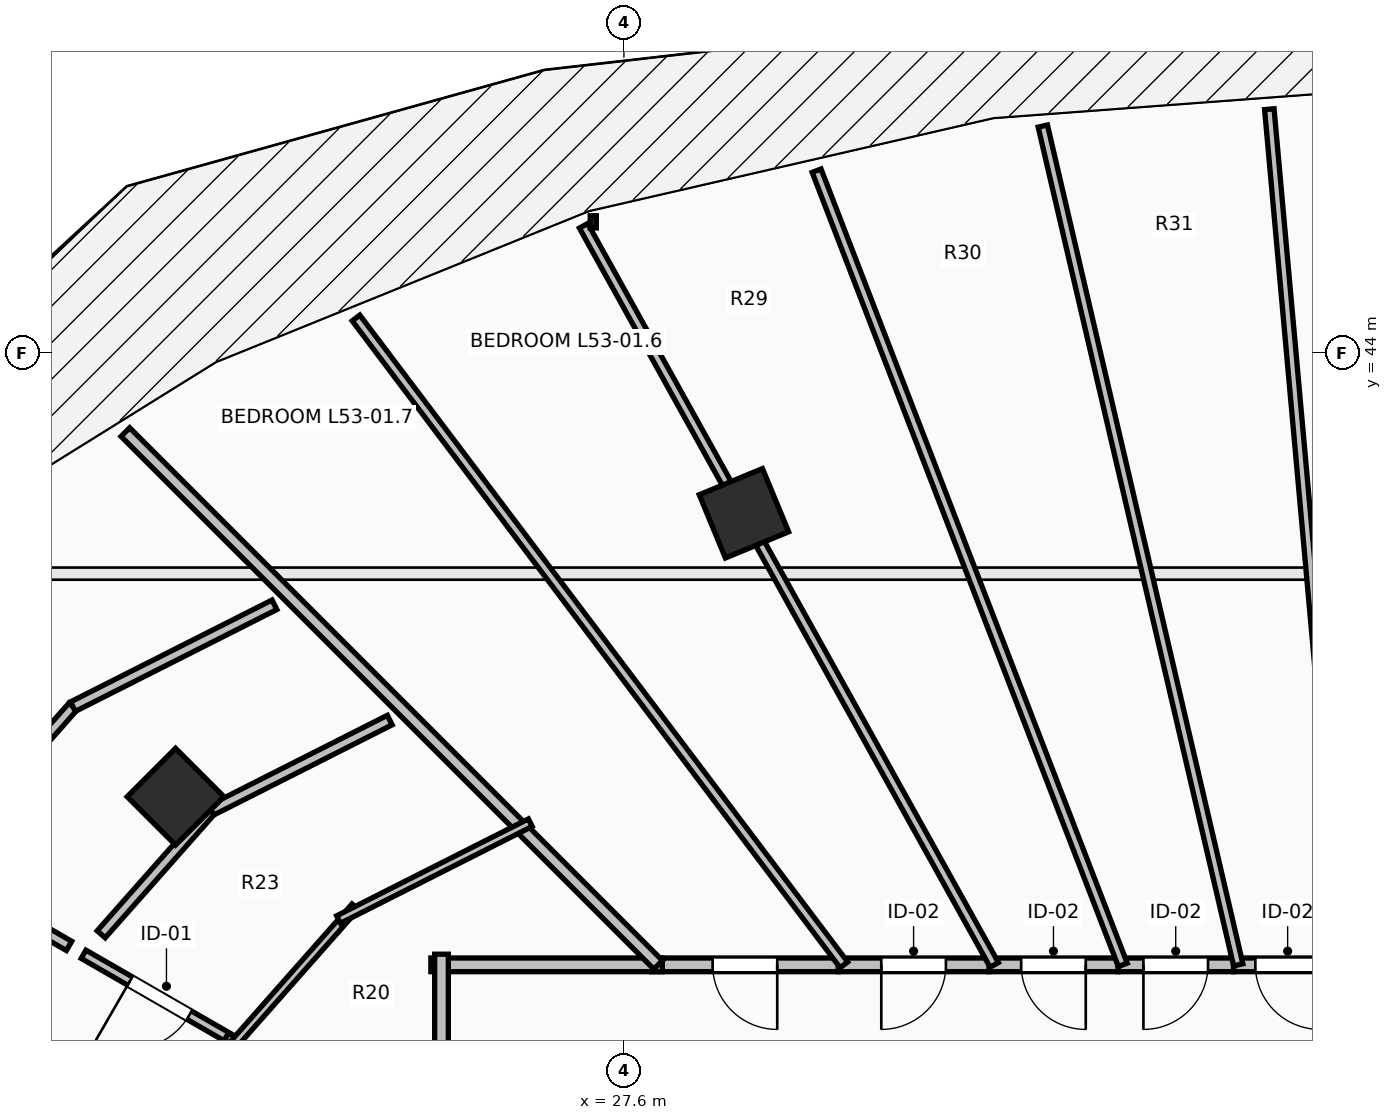
"""IFC4 building model, lengths in metres.
Left out: names, types, materials, properties, quantities, classifications, styles, units other than length and angle.
Written with IfcOpenShell. Run it as: python <this file> out.ifc"""

import sys

from ifc_helpers import new_model, si_unit, direction, frame, frame_2d, origin, origin_2d, place, context, subcontext, project, spatial, rectangle, extrude, element, fill, save


model = new_model("IFC4")
c1 = context("Model", 3, precision=1e-05, world=origin(), true_north=direction((0.0, 1.0)))
c2 = subcontext(c1, "Body", "Model", "MODEL_VIEW")
j1 = project(units=[si_unit("LENGTHUNIT", "METRE"), si_unit("PLANEANGLEUNIT", "RADIAN")], contexts=[c1])
p1 = place(None, origin())
s1 = spatial("IfcSite", under=j1, at=p1, CompositionType="ELEMENT")
p2 = place(p1, origin())
s2 = spatial("IfcBuilding", under=s1, at=p2, CompositionType="ELEMENT")
p3 = place(p2, frame((0.0, 0.0, 196.6)))
s3 = spatial("IfcBuildingStorey", under=s2, at=p3, CompositionType="ELEMENT", Elevation=196.6)
for number, where, z_axis, x_axis in (
    (1, (29.179, 41.891, 0.0), (0.0, 0.0, 1.0), (-0.383, 0.924, 0.0)),
    (2, (21.701, 38.162, 0.0), (0.0, 0.0, 1.0), (-0.707, 0.707, 0.0)),
):
    element("IfcColumn", number, at=place(p3, frame(where, z_axis=z_axis, x_axis=x_axis)), inside=s3, PredefinedType="COLUMN", context=c2, shape_type="SweptSolid", body=[
        extrude(rectangle(XDim=0.9, YDim=0.9, at=origin_2d()), origin(), (0.0, 0.0, 1.0), 3.5),
    ])
p4 = place(p3, frame((37.044, 35.95, 0.0), z_axis=(0.0, 0.0, 1.0), x_axis=(-1.0, 0.0, 0.0)))
e3 = element("IfcWall", 3, at=p4, inside=s3, PredefinedType="PARTITIONING", context=c2, shape_type="SweptSolid", body=[
    extrude(rectangle(XDim=1.424, YDim=0.18, at=frame_2d((0.712, 0.0))), origin(), (0.0, 0.0, 1.0), 3.24),
])
p5 = place(p4, frame((0.287, 0.0, 0.0)))
e4 = element("IfcOpeningElement", 4, at=p5, cuts=e3, PredefinedType="OPENING", context=c2, shape_type="SweptSolid", body=[
    extrude(rectangle(XDim=0.85, YDim=2.1, at=frame_2d((0.425, 1.05))), frame((0.0, 0.105, 0.0), z_axis=(0.0, -1.0, 0.0), x_axis=(1.0, 0.0, 0.0)), (0.0, 0.0, 1.0), 0.21),
])
p6 = place(p3, frame((35.62, 35.95, 0.0), z_axis=(0.0, 0.0, 1.0), x_axis=(-1.0, 0.0, 0.0)))
e5 = element("IfcWall", 5, at=p6, inside=s3, PredefinedType="PARTITIONING", context=c2, shape_type="SweptSolid", body=[
    extrude(rectangle(XDim=1.521, YDim=0.18, at=frame_2d((0.76, 0.0))), origin(), (0.0, 0.0, 1.0), 3.24),
])
p7 = place(p6, frame((0.335, 0.0, 0.0)))
e6 = element("IfcOpeningElement", 6, at=p7, cuts=e5, PredefinedType="OPENING", context=c2, shape_type="SweptSolid", body=[
    extrude(rectangle(XDim=0.85, YDim=2.1, at=frame_2d((0.425, 1.05))), frame((0.0, 0.105, 0.0), z_axis=(0.0, -1.0, 0.0), x_axis=(1.0, 0.0, 0.0)), (0.0, 0.0, 1.0), 0.21),
])
p8 = place(p3, frame((34.099, 35.95, 0.0), z_axis=(0.0, 0.0, 1.0), x_axis=(-1.0, 0.0, 0.0)))
e7 = element("IfcWall", 7, at=p8, inside=s3, PredefinedType="PARTITIONING", context=c2, shape_type="SweptSolid", body=[
    extrude(rectangle(XDim=1.696, YDim=0.18, at=frame_2d((0.848, 0.0))), origin(), (0.0, 0.0, 1.0), 3.24),
])
p9 = place(p8, frame((0.423, 0.0, 0.0)))
e8 = element("IfcOpeningElement", 8, at=p9, cuts=e7, PredefinedType="OPENING", context=c2, shape_type="SweptSolid", body=[
    extrude(rectangle(XDim=0.85, YDim=2.1, at=frame_2d((0.425, 1.05))), frame((0.0, 0.105, 0.0), z_axis=(0.0, -1.0, 0.0), x_axis=(1.0, 0.0, 0.0)), (0.0, 0.0, 1.0), 0.21),
])
p10 = place(p3, frame((32.403, 35.95, 0.0), z_axis=(0.0, 0.0, 1.0), x_axis=(-1.0, 0.0, 0.0)))
e9 = element("IfcWall", 9, at=p10, inside=s3, PredefinedType="PARTITIONING", context=c2, shape_type="SweptSolid", body=[
    extrude(rectangle(XDim=1.984, YDim=0.18, at=frame_2d((0.992, 0.0))), origin(), (0.0, 0.0, 1.0), 2.432),
])
p11 = place(p10, frame((0.567, 0.0, 0.0)))
e10 = element("IfcOpeningElement", 10, at=p11, cuts=e9, PredefinedType="OPENING", context=c2, shape_type="SweptSolid", body=[
    extrude(rectangle(XDim=0.85, YDim=2.1, at=frame_2d((0.425, 1.05))), frame((0.0, 0.105, 0.0), z_axis=(0.0, -1.0, 0.0), x_axis=(1.0, 0.0, 0.0)), (0.0, 0.0, 1.0), 0.21),
])
p12 = place(p3, frame((30.419, 35.95, 0.0), z_axis=(0.0, 0.0, 1.0), x_axis=(-1.0, 0.0, 0.0)))
e11 = element("IfcWall", 11, at=p12, inside=s3, PredefinedType="PARTITIONING", context=c2, shape_type="SweptSolid", body=[
    extrude(rectangle(XDim=2.454, YDim=0.18, at=frame_2d((1.227, 0.0))), origin(), (0.0, 0.0, 1.0), 2.432),
])
p13 = place(p12, frame((0.802, 0.0, 0.0)))
e12 = element("IfcOpeningElement", 12, at=p13, cuts=e11, PredefinedType="OPENING", context=c2, shape_type="SweptSolid", body=[
    extrude(rectangle(XDim=0.85, YDim=2.1, at=frame_2d((0.425, 1.05))), frame((0.0, 0.105, 0.0), z_axis=(0.0, -1.0, 0.0), x_axis=(1.0, 0.0, 0.0)), (0.0, 0.0, 1.0), 0.21),
])
p14 = place(p3, frame((28.105, 35.95, 0.0), z_axis=(0.0, 0.0, 1.0), x_axis=(-1.0, 0.0, 0.0)))
e13 = element("IfcWall", 13, at=p14, inside=s3, PredefinedType="PARTITIONING", context=c2, shape_type="SweptSolid", body=[
    extrude(rectangle(XDim=3.045, YDim=0.18, at=frame_2d((1.522, 0.0))), origin(), (0.0, 0.0, 1.0), 2.432),
])
p15 = place(p3, frame((25.2, 36.09, 0.0), z_axis=(0.0, 0.0, 1.0), x_axis=(0.0, -1.0, 0.0)))
e14 = element("IfcWall", 14, at=p15, inside=s3, PredefinedType="PARTITIONING", context=c2, shape_type="SweptSolid", body=[
    extrude(rectangle(XDim=2.785, YDim=0.18, at=frame_2d((1.393, 0.0))), origin(), (0.0, 0.0, 1.0), 2.432),
])
p16 = place(p3, frame((36.091, 47.207, 0.0), z_axis=(0.0, 0.0, 1.0), x_axis=(0.089620343685, -0.995976000714, 0.0)))
e15 = element("IfcWall", 15, at=p16, inside=s3, PredefinedType="PARTITIONING", context=c2, shape_type="SweptSolid", body=[
    extrude(rectangle(XDim=11.302, YDim=0.125, at=frame_2d((5.651, 0.0))), origin(), (0.0, 0.0, 1.0), 2.432),
])
p17 = place(p3, frame((33.111, 46.985, 0.0), z_axis=(0.0, 0.0, 1.0), x_axis=(0.226889028745, -0.973920617214, 0.0)))
e16 = element("IfcWall", 16, at=p17, inside=s3, PredefinedType="PARTITIONING", context=c2, shape_type="SweptSolid", body=[
    extrude(rectangle(XDim=11.331, YDim=0.125, at=frame_2d((5.665, 0.0))), origin(), (0.0, 0.0, 1.0), 2.432),
])
p18 = place(p3, frame((30.135, 46.398, 0.0), z_axis=(0.0, 0.0, 1.0), x_axis=(0.359727007777, -0.933057597298, 0.0)))
e17 = element("IfcWall", 17, at=p18, inside=s3, PredefinedType="PARTITIONING", context=c2, shape_type="SweptSolid", body=[
    extrude(rectangle(XDim=11.198, YDim=0.125, at=frame_2d((5.599, 0.0))), origin(), (0.0, 0.0, 1.0), 2.432),
])
p19 = place(p3, frame((27.069, 45.673, 0.0), z_axis=(0.0, 0.0, 1.0), x_axis=(0.485717471054, -0.874115860921, 0.0)))
e18 = element("IfcWall", 18, at=p19, inside=s3, PredefinedType="PARTITIONING", context=c2, shape_type="SweptSolid", body=[
    extrude(rectangle(XDim=11.123, YDim=0.125, at=frame_2d((5.562, 0.0))), origin(), (0.0, 0.0, 1.0), 2.432),
])
p20 = place(p3, frame((24.075, 44.46, 0.0), z_axis=(0.0, 0.0, 1.0), x_axis=(0.602185523072, -0.798356183544, 0.0)))
e19 = element("IfcWall", 19, at=p20, inside=s3, PredefinedType="PARTITIONING", context=c2, shape_type="SweptSolid", body=[
    extrude(rectangle(XDim=10.659, YDim=0.125, at=frame_2d((5.33, 0.0))), origin(), (0.0, 0.0, 1.0), 2.432),
])
p21 = place(p3, frame((21.041, 42.959, 0.0), z_axis=(0.0, 0.0, 1.0), x_axis=(0.707106781187, -0.707106781187, 0.0)))
e20 = element("IfcWall", 20, at=p21, inside=s3, PredefinedType="PARTITIONING", context=c2, shape_type="SweptSolid", body=[
    extrude(rectangle(XDim=9.912, YDim=0.16, at=frame_2d((4.956, 0.0))), origin(), (0.0, 0.0, 1.0), 2.432),
])
p22 = place(p3, frame((22.492, 34.936, 0.0), z_axis=(0.0, 0.0, 1.0), x_axis=(-0.866435390844, 0.499289208267, 0.0)))
e21 = element("IfcWall", 21, at=p22, inside=s3, PredefinedType="PARTITIONING", context=c2, shape_type="SweptSolid", body=[
    extrude(rectangle(XDim=2.309, YDim=0.125, at=frame_2d((1.155, 0.0))), origin(), (0.0, 0.0, 1.0), 2.922),
])
p23 = place(p22, frame((0.705, 0.0, 0.0)))
e22 = element("IfcOpeningElement", 22, at=p23, cuts=e21, PredefinedType="OPENING", context=c2, shape_type="SweptSolid", body=[
    extrude(rectangle(XDim=0.9, YDim=2.1, at=frame_2d((0.45, 1.05))), frame((0.0, 0.077, 0.0), z_axis=(0.0, -1.0, 0.0), x_axis=(1.0, 0.0, 0.0)), (0.0, 0.0, 1.0), 0.155),
])
p24 = place(p3, frame((25.321, 33.306, 0.0), z_axis=(0.0, 0.0, 1.0), x_axis=(-0.866517217622, 0.49914718427, 0.0)))
e23 = element("IfcWall", 23, at=p24, inside=s3, PredefinedType="PARTITIONING", context=c2, shape_type="SweptSolid", body=[
    extrude(rectangle(XDim=3.405, YDim=0.11, at=frame_2d((1.703, 0.0))), origin(), (0.0, 0.0, 1.0), 2.922),
])
p25 = place(p24, frame((1.278, 0.0, 0.0)))
e24 = element("IfcOpeningElement", 24, at=p25, cuts=e23, PredefinedType="OPENING", context=c2, shape_type="SweptSolid", body=[
    extrude(rectangle(XDim=0.85, YDim=2.1, at=frame_2d((0.425, 1.05))), frame((0.0, 0.07, 0.0), z_axis=(0.0, -1.0, 0.0), x_axis=(1.0, 0.0, 0.0)), (0.0, 0.0, 1.0), 0.14),
])
p26 = place(p3, frame((22.399, 34.831, 0.0), z_axis=(0.0, 0.0, 1.0), x_axis=(0.662292938072, 0.749244996099, 0.0)))
e25 = element("IfcWall", 25, at=p26, inside=s3, PredefinedType="PARTITIONING", context=c2, shape_type="SweptSolid", body=[
    extrude(rectangle(XDim=2.513, YDim=0.11, at=frame_2d((1.256, 0.0))), origin(), (0.0, 0.0, 1.0), 2.432),
])
p27 = place(p3, frame((23.846, 36.546, 0.0), z_axis=(0.0, 0.0, 1.0), x_axis=(0.892553076465, 0.450942352959, 0.0)))
e26 = element("IfcWall", 26, at=p27, inside=s3, PredefinedType="PARTITIONING", context=c2, shape_type="SweptSolid", body=[
    extrude(rectangle(XDim=2.826, YDim=0.11, at=frame_2d((1.413, 0.0))), origin(), (0.0, 0.0, 1.0), 2.432),
])
p28 = place(p3, frame((18.49, 37.242, 0.0), z_axis=(0.0, 0.0, 1.0), x_axis=(0.662371376331, 0.749175653513, 0.0)))
e27 = element("IfcWall", 27, at=p28, inside=s3, PredefinedType="PARTITIONING", context=c2, shape_type="SweptSolid", body=[
    extrude(rectangle(XDim=2.81, YDim=0.14, at=frame_2d((1.405, 0.0))), origin(), (0.0, 0.0, 1.0), 3.24),
])
p29 = place(p3, frame((20.351, 39.347, 0.0), z_axis=(0.0, 0.0, 1.0), x_axis=(0.89244587056, 0.451154483653, 0.0)))
e28 = element("IfcWall", 28, at=p29, inside=s3, PredefinedType="PARTITIONING", context=c2, shape_type="SweptSolid", body=[
    extrude(rectangle(XDim=2.97, YDim=0.14, at=frame_2d((1.485, 0.0))), origin(), (0.0, 0.0, 1.0), 3.24),
])
p30 = place(p3, frame((20.3, 36.199, 0.0), z_axis=(0.0, 0.0, 1.0), x_axis=(-0.86645395742, 0.499256987604, 0.0)))
e29 = element("IfcWall", 29, at=p30, inside=s3, PredefinedType="PARTITIONING", context=c2, shape_type="SweptSolid", body=[
    extrude(rectangle(XDim=2.089, YDim=0.14, at=frame_2d((1.044, 0.0))), origin(), (0.0, 0.0, 1.0), 2.774),
])
p31 = place(p3, frame((24.519, 39.17, 0.0), z_axis=(0.0, 0.0, 1.0), x_axis=(-0.89247840077, -0.451090128643, 0.0)))
e30 = element("IfcWall", 30, at=p31, inside=s3, PredefinedType="PARTITIONING", context=c2, shape_type="SweptSolid", body=[
    extrude(rectangle(XDim=2.642, YDim=0.14, at=frame_2d((1.321, 0.0))), origin(), (0.0, 0.0, 1.0), 2.432),
])
p32 = place(p3, frame((22.161, 37.978, 0.0), z_axis=(0.0, 0.0, 1.0), x_axis=(-0.662476802918, -0.749082429106, 0.0)))
e31 = element("IfcWall", 31, at=p32, inside=s3, PredefinedType="PARTITIONING", context=c2, shape_type="SweptSolid", body=[
    extrude(rectangle(XDim=2.171, YDim=0.14, at=frame_2d((1.085, 0.0))), origin(), (0.0, 0.0, 1.0), 2.432),
])
p33 = place(p23, origin())
e32 = element("IfcDoor", 32, at=p33, inside=s3, OperationType="SINGLE_SWING_RIGHT", PredefinedType="DOOR", context=c2, shape_type="SweptSolid", body=[
    extrude(rectangle(XDim=0.9, YDim=2.1, at=frame_2d((0.45, 1.05))), frame((0.0, 0.025, 0.0), z_axis=(0.0, -1.0, 0.0), x_axis=(1.0, 0.0, 0.0)), (0.0, 0.0, 1.0), 0.05),
])
fill(e22, e32)
p34 = place(p5, origin())
e33 = element("IfcDoor", 33, at=p34, inside=s3, OperationType="SINGLE_SWING_LEFT", PredefinedType="DOOR", context=c2, shape_type="SweptSolid", body=[
    extrude(rectangle(XDim=0.85, YDim=2.1, at=frame_2d((0.425, 1.05))), frame((0.0, 0.025, 0.0), z_axis=(0.0, -1.0, 0.0), x_axis=(1.0, 0.0, 0.0)), (0.0, 0.0, 1.0), 0.05),
])
fill(e4, e33)
p35 = place(p7, origin())
e34 = element("IfcDoor", 34, at=p35, inside=s3, OperationType="SINGLE_SWING_RIGHT", PredefinedType="DOOR", context=c2, shape_type="SweptSolid", body=[
    extrude(rectangle(XDim=0.85, YDim=2.1, at=frame_2d((0.425, 1.05))), frame((0.0, 0.025, 0.0), z_axis=(0.0, -1.0, 0.0), x_axis=(1.0, 0.0, 0.0)), (0.0, 0.0, 1.0), 0.05),
])
fill(e6, e34)
p36 = place(p9, origin())
e35 = element("IfcDoor", 35, at=p36, inside=s3, OperationType="SINGLE_SWING_LEFT", PredefinedType="DOOR", context=c2, shape_type="SweptSolid", body=[
    extrude(rectangle(XDim=0.85, YDim=2.1, at=frame_2d((0.425, 1.05))), frame((0.0, 0.025, 0.0), z_axis=(0.0, -1.0, 0.0), x_axis=(1.0, 0.0, 0.0)), (0.0, 0.0, 1.0), 0.05),
])
fill(e8, e35)
p37 = place(p11, origin())
e36 = element("IfcDoor", 36, at=p37, inside=s3, OperationType="SINGLE_SWING_RIGHT", PredefinedType="DOOR", context=c2, shape_type="SweptSolid", body=[
    extrude(rectangle(XDim=0.85, YDim=2.1, at=frame_2d((0.425, 1.05))), frame((0.0, 0.025, 0.0), z_axis=(0.0, -1.0, 0.0), x_axis=(1.0, 0.0, 0.0)), (0.0, 0.0, 1.0), 0.05),
])
fill(e10, e36)
p38 = place(p13, origin())
e37 = element("IfcDoor", 37, at=p38, inside=s3, OperationType="SINGLE_SWING_LEFT", PredefinedType="DOOR", context=c2, shape_type="SweptSolid", body=[
    extrude(rectangle(XDim=0.85, YDim=2.1, at=frame_2d((0.425, 1.05))), frame((0.0, 0.025, 0.0), z_axis=(0.0, -1.0, 0.0), x_axis=(1.0, 0.0, 0.0)), (0.0, 0.0, 1.0), 0.05),
])
fill(e12, e37)
save(model, sys.argv[1])
